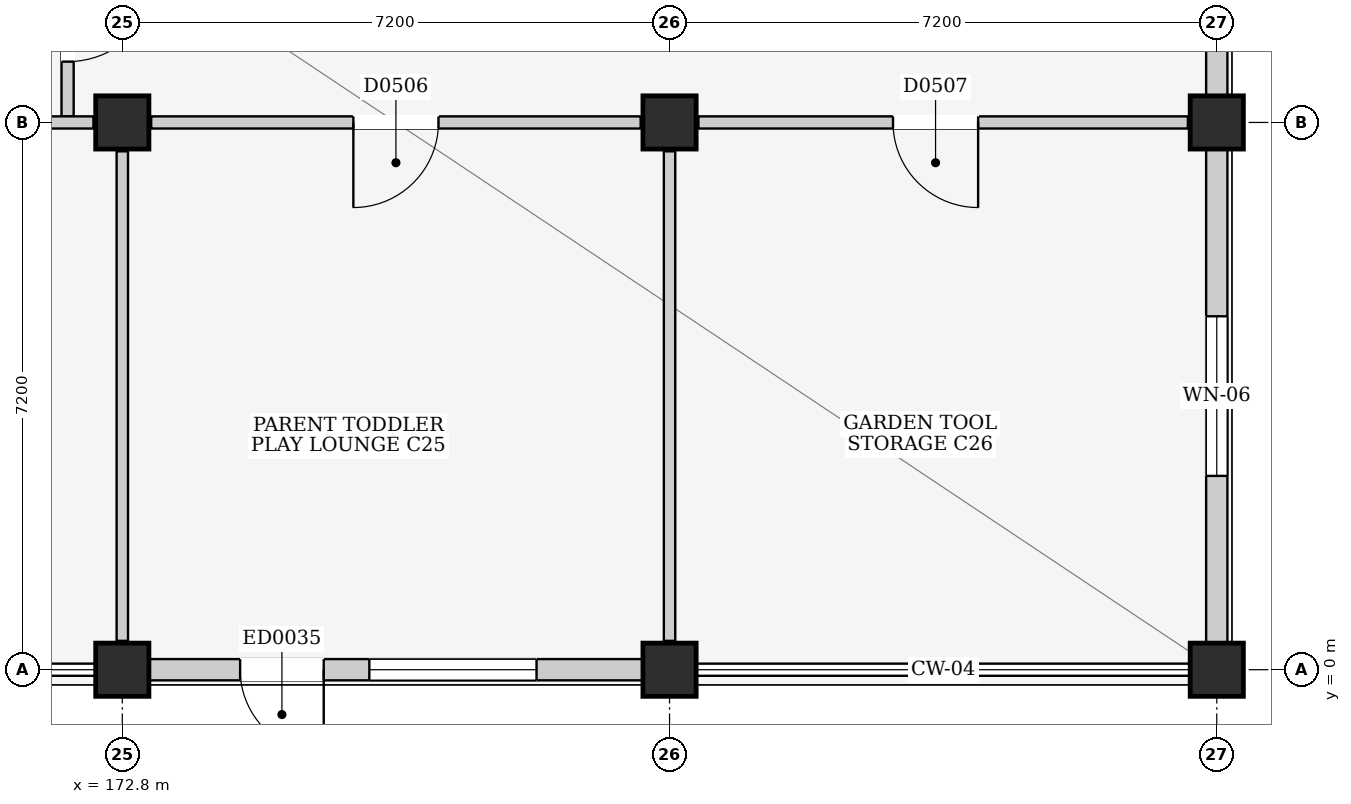
"""IFC4 building model, lengths in metres.
Left out: names, types, materials, properties, quantities, classifications, styles, units other than length and angle.
Written with IfcOpenShell. Run it as: python <this file> out.ifc"""

import sys

from ifc_helpers import new_model, si_unit, direction, frame, frame_2d, origin, origin_2d, place, context, subcontext, project, spatial, rectangle, extrude, element, fill, save


model = new_model("IFC4")
c1 = context("Model", 3, precision=1e-05, world=origin(), true_north=direction((0.0, 1.0)))
c2 = subcontext(c1, "Body", "Model", "MODEL_VIEW")
j1 = project(units=[si_unit("LENGTHUNIT", "METRE"), si_unit("PLANEANGLEUNIT", "RADIAN")], contexts=[c1])
p1 = place(None, origin())
s1 = spatial("IfcSite", under=j1, at=p1, CompositionType="ELEMENT")
p2 = place(p1, origin())
s2 = spatial("IfcBuilding", under=s1, at=p2, CompositionType="ELEMENT")
p3 = place(p2, origin())
s3 = spatial("IfcBuildingStorey", under=s2, at=p3, CompositionType="ELEMENT", Elevation=0.0)
for number, where, z_axis, x_axis in (
    (1, (172.8, 0.0, 0.0), (0.0, 0.0, 1.0), (1.0, 0.0, 0.0)),
    (2, (172.8, 7.2, 0.0), (0.0, 0.0, 1.0), (1.0, 0.0, 0.0)),
    (3, (180.0, 0.0, 0.0), (0.0, 0.0, 1.0), (1.0, 0.0, 0.0)),
    (4, (180.0, 7.2, 0.0), (0.0, 0.0, 1.0), (1.0, 0.0, 0.0)),
    (5, (187.2, 0.0, 0.0), (0.0, 0.0, 1.0), (1.0, 0.0, 0.0)),
    (6, (187.2, 7.2, 0.0), (0.0, 0.0, 1.0), (1.0, 0.0, 0.0)),
):
    element("IfcColumn", number, at=place(p3, frame(where, z_axis=z_axis, x_axis=x_axis)), inside=s3, PredefinedType="COLUMN", context=c2, shape_type="SweptSolid", body=[
        extrude(rectangle(XDim=0.7, YDim=0.7, at=origin_2d()), origin(), (0.0, 0.0, 1.0), 4.5),
    ])
p4 = place(p3, frame((173.15, 0.0, 0.0), z_axis=(0.0, 0.0, 1.0), x_axis=(1.0, 0.0, 0.0)))
e7 = element("IfcWall", 7, at=p4, inside=s3, PredefinedType="ELEMENTEDWALL", context=c2, shape_type="SweptSolid", body=[
    extrude(rectangle(XDim=6.5, YDim=0.28, at=frame_2d((3.25, 0.0))), origin(), (0.0, 0.0, 1.0), 3.665),
])
p5 = place(p4, frame((1.2, 0.0, 0.0)))
e8 = element("IfcOpeningElement", 8, at=p5, cuts=e7, PredefinedType="OPENING", context=c2, shape_type="SweptSolid", body=[
    extrude(rectangle(XDim=1.1, YDim=2.2, at=frame_2d((0.55, 1.1))), frame((0.0, 0.155, 0.0), z_axis=(0.0, -1.0, 0.0), x_axis=(1.0, 0.0, 0.0)), (0.0, 0.0, 1.0), 0.31),
])
p6 = place(p4, frame((2.9, 0.0, 0.85)))
e9 = element("IfcOpeningElement", 9, at=p6, cuts=e7, PredefinedType="OPENING", context=c2, shape_type="SweptSolid", body=[
    extrude(rectangle(XDim=2.2, YDim=1.8, at=frame_2d((1.1, 0.9))), frame((0.0, 0.155, 0.0), z_axis=(0.0, -1.0, 0.0), x_axis=(1.0, 0.0, 0.0)), (0.0, 0.0, 1.0), 0.31),
])
p7 = place(p3, frame((187.2, 0.35, 0.0), z_axis=(0.0, 0.0, 1.0), x_axis=(0.0, 1.0, 0.0)))
e10 = element("IfcWall", 10, at=p7, inside=s3, PredefinedType="ELEMENTEDWALL", context=c2, shape_type="SweptSolid", body=[
    extrude(rectangle(XDim=6.5, YDim=0.28, at=frame_2d((3.25, 0.0))), origin(), (0.0, 0.0, 1.0), 3.665),
])
p8 = place(p7, frame((2.2, 0.0, 0.95)))
e11 = element("IfcOpeningElement", 11, at=p8, cuts=e10, PredefinedType="OPENING", context=c2, shape_type="SweptSolid", body=[
    extrude(rectangle(XDim=2.1, YDim=1.65, at=frame_2d((1.05, 0.825))), frame((0.0, 0.155, 0.0), z_axis=(0.0, -1.0, 0.0), x_axis=(1.0, 0.0, 0.0)), (0.0, 0.0, 1.0), 0.31),
])
p9 = place(p3, frame((187.2, 7.55, 0.0), z_axis=(0.0, 0.0, 1.0), x_axis=(0.0, 1.0, 0.0)))
e12 = element("IfcWall", 12, at=p9, inside=s3, PredefinedType="ELEMENTEDWALL", context=c2, shape_type="SweptSolid", body=[
    extrude(rectangle(XDim=6.5, YDim=0.28, at=frame_2d((3.25, 0.0))), origin(), (0.0, 0.0, 1.0), 3.665),
])
p10 = place(p9, frame((2.55, 0.0, 0.95)))
e13 = element("IfcOpeningElement", 13, at=p10, cuts=e12, PredefinedType="OPENING", context=c2, shape_type="SweptSolid", body=[
    extrude(rectangle(XDim=1.4, YDim=1.2, at=frame_2d((0.7, 0.6))), frame((0.0, 0.155, 0.0), z_axis=(0.0, -1.0, 0.0), x_axis=(1.0, 0.0, 0.0)), (0.0, 0.0, 1.0), 0.31),
])
p11 = place(p3, frame((172.08, 7.28, 0.0), z_axis=(0.0, 0.0, 1.0), x_axis=(0.0, 1.0, 0.0)))
e14 = element("IfcWall", 14, at=p11, inside=s3, PredefinedType="PARTITIONING", context=c2, shape_type="SweptSolid", body=[
    extrude(rectangle(XDim=4.32, YDim=0.16, at=frame_2d((2.16, 0.0))), origin(), (0.0, 0.0, 1.0), 4.2),
])
p12 = place(p11, frame((0.72, 0.0, 0.0)))
e15 = element("IfcOpeningElement", 15, at=p12, cuts=e14, PredefinedType="OPENING", context=c2, shape_type="SweptSolid", body=[
    extrude(rectangle(XDim=1.2, YDim=2.2, at=frame_2d((0.6, 1.1))), frame((0.0, 0.095, 0.0), z_axis=(0.0, -1.0, 0.0), x_axis=(1.0, 0.0, 0.0)), (0.0, 0.0, 1.0), 0.19),
])
p13 = place(p3, frame((165.98, 7.2, 0.0), z_axis=(0.0, 0.0, 1.0), x_axis=(1.0, 0.0, 0.0)))
e16 = element("IfcWall", 16, at=p13, inside=s3, PredefinedType="PARTITIONING", context=c2, shape_type="SweptSolid", body=[
    extrude(rectangle(XDim=6.44, YDim=0.16, at=frame_2d((3.22, 0.0))), origin(), (0.0, 0.0, 1.0), 3.435),
])
p14 = place(p13, frame((2.66, 0.0, 0.0)))
e17 = element("IfcOpeningElement", 17, at=p14, cuts=e16, PredefinedType="OPENING", context=c2, shape_type="SweptSolid", body=[
    extrude(rectangle(XDim=1.12, YDim=2.2, at=frame_2d((0.56, 1.1))), frame((0.0, 0.095, 0.0), z_axis=(0.0, -1.0, 0.0), x_axis=(1.0, 0.0, 0.0)), (0.0, 0.0, 1.0), 0.19),
])
p15 = place(p3, frame((172.8, 0.38, 0.0), z_axis=(0.0, 0.0, 1.0), x_axis=(0.0, 1.0, 0.0)))
e18 = element("IfcWall", 18, at=p15, inside=s3, PredefinedType="PARTITIONING", context=c2, shape_type="SweptSolid", body=[
    extrude(rectangle(XDim=6.44, YDim=0.15, at=frame_2d((3.22, 0.0))), origin(), (0.0, 0.0, 1.0), 3.435),
])
p16 = place(p3, frame((173.18, 7.2, 0.0), z_axis=(0.0, 0.0, 1.0), x_axis=(1.0, 0.0, 0.0)))
e19 = element("IfcWall", 19, at=p16, inside=s3, PredefinedType="PARTITIONING", context=c2, shape_type="SweptSolid", body=[
    extrude(rectangle(XDim=6.44, YDim=0.16, at=frame_2d((3.22, 0.0))), origin(), (0.0, 0.0, 1.0), 3.435),
])
p17 = place(p16, frame((2.66, 0.0, 0.0)))
e20 = element("IfcOpeningElement", 20, at=p17, cuts=e19, PredefinedType="OPENING", context=c2, shape_type="SweptSolid", body=[
    extrude(rectangle(XDim=1.12, YDim=2.2, at=frame_2d((0.56, 1.1))), frame((0.0, 0.095, 0.0), z_axis=(0.0, -1.0, 0.0), x_axis=(1.0, 0.0, 0.0)), (0.0, 0.0, 1.0), 0.19),
])
p18 = place(p3, frame((180.0, 0.38, 0.0), z_axis=(0.0, 0.0, 1.0), x_axis=(0.0, 1.0, 0.0)))
e21 = element("IfcWall", 21, at=p18, inside=s3, PredefinedType="PARTITIONING", context=c2, shape_type="SweptSolid", body=[
    extrude(rectangle(XDim=6.44, YDim=0.15, at=frame_2d((3.22, 0.0))), origin(), (0.0, 0.0, 1.0), 3.435),
])
p19 = place(p3, frame((180.38, 7.2, 0.0), z_axis=(0.0, 0.0, 1.0), x_axis=(1.0, 0.0, 0.0)))
e22 = element("IfcWall", 22, at=p19, inside=s3, PredefinedType="PARTITIONING", context=c2, shape_type="SweptSolid", body=[
    extrude(rectangle(XDim=6.44, YDim=0.16, at=frame_2d((3.22, 0.0))), origin(), (0.0, 0.0, 1.0), 3.435),
])
p20 = place(p19, frame((2.56, 0.0, 0.0)))
e23 = element("IfcOpeningElement", 23, at=p20, cuts=e22, PredefinedType="OPENING", context=c2, shape_type="SweptSolid", body=[
    extrude(rectangle(XDim=1.12, YDim=2.2, at=frame_2d((0.56, 1.1))), frame((0.0, 0.095, 0.0), z_axis=(0.0, -1.0, 0.0), x_axis=(1.0, 0.0, 0.0)), (0.0, 0.0, 1.0), 0.19),
])
p21 = place(p5, frame((1.1, 0.0, 0.0), z_axis=(0.0, 0.0, 1.0), x_axis=(-1.0, 0.0, 0.0)))
e24 = element("IfcDoor", 24, at=p21, inside=s3, OperationType="SINGLE_SWING_LEFT", PredefinedType="DOOR", context=c2, shape_type="SweptSolid", body=[
    extrude(rectangle(XDim=1.1, YDim=2.2, at=frame_2d((0.55, 1.1))), frame((0.0, 0.025, 0.0), z_axis=(0.0, -1.0, 0.0), x_axis=(1.0, 0.0, 0.0)), (0.0, 0.0, 1.0), 0.05),
])
fill(e8, e24)
p22 = place(p6, origin())
e25 = element("IfcWindow", 25, at=p22, inside=s3, PartitioningType="TRIPLE_PANEL_VERTICAL", PredefinedType="WINDOW", context=c2, shape_type="SweptSolid", body=[
    extrude(rectangle(XDim=2.2, YDim=1.8, at=frame_2d((1.1, 0.9))), frame((0.0, 0.03, 0.0), z_axis=(0.0, -1.0, 0.0), x_axis=(1.0, 0.0, 0.0)), (0.0, 0.0, 1.0), 0.06),
])
fill(e9, e25)
p23 = place(p8, origin())
e26 = element("IfcWindow", 26, at=p23, inside=s3, PartitioningType="DOUBLE_PANEL_VERTICAL", PredefinedType="WINDOW", context=c2, shape_type="SweptSolid", body=[
    extrude(rectangle(XDim=2.1, YDim=1.65, at=frame_2d((1.05, 0.825))), frame((0.0, 0.03, 0.0), z_axis=(0.0, -1.0, 0.0), x_axis=(1.0, 0.0, 0.0)), (0.0, 0.0, 1.0), 0.06),
])
fill(e11, e26)
p24 = place(p12, frame((1.2, 0.0, 0.0), z_axis=(0.0, 0.0, 1.0), x_axis=(-1.0, 0.0, 0.0)))
e27 = element("IfcDoor", 27, at=p24, inside=s3, OperationType="SINGLE_SWING_LEFT", PredefinedType="DOOR", context=c2, shape_type="SweptSolid", body=[
    extrude(rectangle(XDim=1.2, YDim=2.2, at=frame_2d((0.6, 1.1))), frame((0.0, 0.025, 0.0), z_axis=(0.0, -1.0, 0.0), x_axis=(1.0, 0.0, 0.0)), (0.0, 0.0, 1.0), 0.05),
])
fill(e15, e27)
p25 = place(p17, frame((1.12, 0.0, 0.0), z_axis=(0.0, 0.0, 1.0), x_axis=(-1.0, 0.0, 0.0)))
e28 = element("IfcDoor", 28, at=p25, inside=s3, OperationType="SINGLE_SWING_RIGHT", PredefinedType="DOOR", context=c2, shape_type="SweptSolid", body=[
    extrude(rectangle(XDim=1.12, YDim=2.2, at=frame_2d((0.56, 1.1))), frame((0.0, 0.025, 0.0), z_axis=(0.0, -1.0, 0.0), x_axis=(1.0, 0.0, 0.0)), (0.0, 0.0, 1.0), 0.05),
])
fill(e20, e28)
p26 = place(p20, frame((1.12, 0.0, 0.0), z_axis=(0.0, 0.0, 1.0), x_axis=(-1.0, 0.0, 0.0)))
e29 = element("IfcDoor", 29, at=p26, inside=s3, OperationType="SINGLE_SWING_LEFT", PredefinedType="DOOR", context=c2, shape_type="SweptSolid", body=[
    extrude(rectangle(XDim=1.12, YDim=2.2, at=frame_2d((0.56, 1.1))), frame((0.0, 0.025, 0.0), z_axis=(0.0, -1.0, 0.0), x_axis=(1.0, 0.0, 0.0)), (0.0, 0.0, 1.0), 0.05),
])
fill(e23, e29)
save(model, sys.argv[1])
